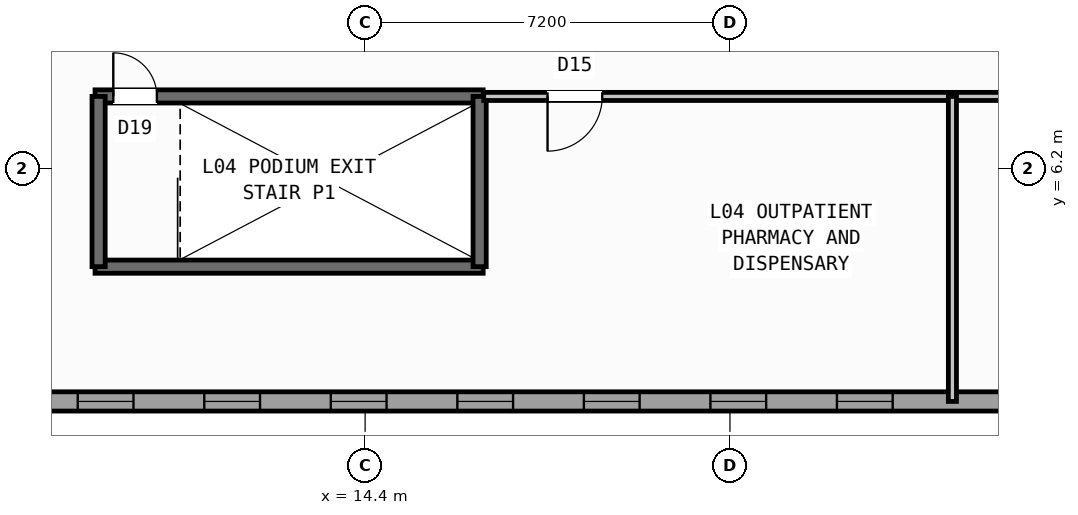
"""IFC4 building model, lengths in metres.
Left out: names, types, materials, properties, quantities, classifications, styles, units other than length and angle.
Written with IfcOpenShell. Run it as: python <this file> out.ifc"""

import sys

from ifc_helpers import new_model, si_unit, direction, frame, frame_2d, origin, place, context, subcontext, project, spatial, rectangle, extrude, source, transform, mapped, element, fill, save


model = new_model("IFC4")
c1 = context("Model", 3, precision=1e-05, world=origin(), true_north=direction((0.0, 1.0)))
c2 = subcontext(c1, "Body", "Model", "MODEL_VIEW")
j1 = project(units=[si_unit("LENGTHUNIT", "METRE"), si_unit("PLANEANGLEUNIT", "RADIAN")], contexts=[c1])
p1 = place(None, origin())
s1 = spatial("IfcSite", under=j1, at=p1, CompositionType="ELEMENT")
p2 = place(p1, origin())
s2 = spatial("IfcBuilding", under=s1, at=p2, CompositionType="ELEMENT")
p3 = place(p2, frame((0.0, 0.0, 18.6)))
s3 = spatial("IfcBuildingStorey", under=s2, at=p3, CompositionType="ELEMENT", Elevation=18.6)
p4 = place(p3, frame((67.117, 1.6, 0.0), z_axis=(0.0, 0.0, 1.0), x_axis=(-1.0, 0.0, 0.0)))
e1 = element("IfcWall", 1, at=p4, inside=s3, PredefinedType="STANDARD", context=c2, shape_type="SweptSolid", body=[
    extrude(rectangle(XDim=62.234, YDim=0.38, at=frame_2d((31.117, 0.0))), origin(), (0.0, 0.0, 1.0), 4.95),
])
p5 = place(p4, frame((1.735, 0.0, 0.85)))
e2 = element("IfcOpeningElement", 2, at=p5, cuts=e1, PredefinedType="OPENING", context=c2, shape_type="SweptSolid", body=[
    extrude(rectangle(XDim=2.2, YDim=1.75, at=frame_2d((1.1, 0.875))), frame((0.0, 0.2, 0.0), z_axis=(0.0, -1.0, 0.0), x_axis=(1.0, 0.0, 0.0)), (0.0, 0.0, 1.0), 0.4),
])
p6 = place(p4, frame((6.104, 0.0, 0.85)))
e3 = element("IfcOpeningElement", 3, at=p6, cuts=e1, PredefinedType="OPENING", context=c2, shape_type="SweptSolid", body=[
    extrude(rectangle(XDim=2.2, YDim=1.75, at=frame_2d((1.1, 0.875))), frame((0.0, 0.2, 0.0), z_axis=(0.0, -1.0, 0.0), x_axis=(1.0, 0.0, 0.0)), (0.0, 0.0, 1.0), 0.4),
])
p7 = place(p4, frame((10.473, 0.0, 0.85)))
e4 = element("IfcOpeningElement", 4, at=p7, cuts=e1, PredefinedType="OPENING", context=c2, shape_type="SweptSolid", body=[
    extrude(rectangle(XDim=2.2, YDim=1.75, at=frame_2d((1.1, 0.875))), frame((0.0, 0.2, 0.0), z_axis=(0.0, -1.0, 0.0), x_axis=(1.0, 0.0, 0.0)), (0.0, 0.0, 1.0), 0.4),
])
p8 = place(p4, frame((15.277, 0.0, 1.0)))
e5 = element("IfcOpeningElement", 5, at=p8, cuts=e1, PredefinedType="OPENING", context=c2, shape_type="SweptSolid", body=[
    extrude(rectangle(XDim=1.1, YDim=1.35, at=frame_2d((0.55, 0.675))), frame((0.0, 0.2, 0.0), z_axis=(0.0, -1.0, 0.0), x_axis=(1.0, 0.0, 0.0)), (0.0, 0.0, 1.0), 0.4),
])
p9 = place(p4, frame((18.422, 0.0, 0.95)))
e6 = element("IfcOpeningElement", 6, at=p9, cuts=e1, PredefinedType="OPENING", context=c2, shape_type="SweptSolid", body=[
    extrude(rectangle(XDim=1.4, YDim=1.5, at=frame_2d((0.7, 0.75))), frame((0.0, 0.2, 0.0), z_axis=(0.0, -1.0, 0.0), x_axis=(1.0, 0.0, 0.0)), (0.0, 0.0, 1.0), 0.4),
])
p10 = place(p4, frame((21.967, 0.0, 1.0)))
e7 = element("IfcOpeningElement", 7, at=p10, cuts=e1, PredefinedType="OPENING", context=c2, shape_type="SweptSolid", body=[
    extrude(rectangle(XDim=1.1, YDim=1.35, at=frame_2d((0.55, 0.675))), frame((0.0, 0.2, 0.0), z_axis=(0.0, -1.0, 0.0), x_axis=(1.0, 0.0, 0.0)), (0.0, 0.0, 1.0), 0.4),
])
p11 = place(p4, frame((24.387, 0.0, 1.0)))
e8 = element("IfcOpeningElement", 8, at=p11, cuts=e1, PredefinedType="OPENING", context=c2, shape_type="SweptSolid", body=[
    extrude(rectangle(XDim=1.1, YDim=1.35, at=frame_2d((0.55, 0.675))), frame((0.0, 0.2, 0.0), z_axis=(0.0, -1.0, 0.0), x_axis=(1.0, 0.0, 0.0)), (0.0, 0.0, 1.0), 0.4),
])
p12 = place(p4, frame((27.792, 0.0, 0.95)))
e9 = element("IfcOpeningElement", 9, at=p12, cuts=e1, PredefinedType="OPENING", context=c2, shape_type="SweptSolid", body=[
    extrude(rectangle(XDim=1.4, YDim=1.5, at=frame_2d((0.7, 0.75))), frame((0.0, 0.2, 0.0), z_axis=(0.0, -1.0, 0.0), x_axis=(1.0, 0.0, 0.0)), (0.0, 0.0, 1.0), 0.4),
])
p13 = place(p4, frame((30.562, 0.0, 0.95)))
e10 = element("IfcOpeningElement", 10, at=p13, cuts=e1, PredefinedType="OPENING", context=c2, shape_type="SweptSolid", body=[
    extrude(rectangle(XDim=1.4, YDim=1.5, at=frame_2d((0.7, 0.75))), frame((0.0, 0.2, 0.0), z_axis=(0.0, -1.0, 0.0), x_axis=(1.0, 0.0, 0.0)), (0.0, 0.0, 1.0), 0.4),
])
p14 = place(p4, frame((34.267, 0.0, 0.85)))
e11 = element("IfcOpeningElement", 11, at=p14, cuts=e1, PredefinedType="OPENING", context=c2, shape_type="SweptSolid", body=[
    extrude(rectangle(XDim=2.2, YDim=1.75, at=frame_2d((1.1, 0.875))), frame((0.0, 0.2, 0.0), z_axis=(0.0, -1.0, 0.0), x_axis=(1.0, 0.0, 0.0)), (0.0, 0.0, 1.0), 0.4),
])
p15 = place(p4, frame((37.787, 0.0, 0.85)))
e12 = element("IfcOpeningElement", 12, at=p15, cuts=e1, PredefinedType="OPENING", context=c2, shape_type="SweptSolid", body=[
    extrude(rectangle(XDim=2.2, YDim=1.75, at=frame_2d((1.1, 0.875))), frame((0.0, 0.2, 0.0), z_axis=(0.0, -1.0, 0.0), x_axis=(1.0, 0.0, 0.0)), (0.0, 0.0, 1.0), 0.4),
])
p16 = place(p4, frame((42.306, 0.0, 1.0)))
e13 = element("IfcOpeningElement", 13, at=p16, cuts=e1, PredefinedType="OPENING", context=c2, shape_type="SweptSolid", body=[
    extrude(rectangle(XDim=1.1, YDim=1.35, at=frame_2d((0.55, 0.675))), frame((0.0, 0.2, 0.0), z_axis=(0.0, -1.0, 0.0), x_axis=(1.0, 0.0, 0.0)), (0.0, 0.0, 1.0), 0.4),
])
p17 = place(p4, frame((44.803, 0.0, 1.0)))
e14 = element("IfcOpeningElement", 14, at=p17, cuts=e1, PredefinedType="OPENING", context=c2, shape_type="SweptSolid", body=[
    extrude(rectangle(XDim=1.1, YDim=1.35, at=frame_2d((0.55, 0.675))), frame((0.0, 0.2, 0.0), z_axis=(0.0, -1.0, 0.0), x_axis=(1.0, 0.0, 0.0)), (0.0, 0.0, 1.0), 0.4),
])
p18 = place(p4, frame((47.3, 0.0, 1.0)))
e15 = element("IfcOpeningElement", 15, at=p18, cuts=e1, PredefinedType="OPENING", context=c2, shape_type="SweptSolid", body=[
    extrude(rectangle(XDim=1.1, YDim=1.35, at=frame_2d((0.55, 0.675))), frame((0.0, 0.2, 0.0), z_axis=(0.0, -1.0, 0.0), x_axis=(1.0, 0.0, 0.0)), (0.0, 0.0, 1.0), 0.4),
])
p19 = place(p4, frame((49.797, 0.0, 1.0)))
e16 = element("IfcOpeningElement", 16, at=p19, cuts=e1, PredefinedType="OPENING", context=c2, shape_type="SweptSolid", body=[
    extrude(rectangle(XDim=1.1, YDim=1.35, at=frame_2d((0.55, 0.675))), frame((0.0, 0.2, 0.0), z_axis=(0.0, -1.0, 0.0), x_axis=(1.0, 0.0, 0.0)), (0.0, 0.0, 1.0), 0.4),
])
p20 = place(p4, frame((52.294, 0.0, 1.0)))
e17 = element("IfcOpeningElement", 17, at=p20, cuts=e1, PredefinedType="OPENING", context=c2, shape_type="SweptSolid", body=[
    extrude(rectangle(XDim=1.1, YDim=1.35, at=frame_2d((0.55, 0.675))), frame((0.0, 0.2, 0.0), z_axis=(0.0, -1.0, 0.0), x_axis=(1.0, 0.0, 0.0)), (0.0, 0.0, 1.0), 0.4),
])
p21 = place(p4, frame((54.792, 0.0, 1.0)))
e18 = element("IfcOpeningElement", 18, at=p21, cuts=e1, PredefinedType="OPENING", context=c2, shape_type="SweptSolid", body=[
    extrude(rectangle(XDim=1.1, YDim=1.35, at=frame_2d((0.55, 0.675))), frame((0.0, 0.2, 0.0), z_axis=(0.0, -1.0, 0.0), x_axis=(1.0, 0.0, 0.0)), (0.0, 0.0, 1.0), 0.4),
])
p22 = place(p4, frame((57.289, 0.0, 1.0)))
e19 = element("IfcOpeningElement", 19, at=p22, cuts=e1, PredefinedType="OPENING", context=c2, shape_type="SweptSolid", body=[
    extrude(rectangle(XDim=1.1, YDim=1.35, at=frame_2d((0.55, 0.675))), frame((0.0, 0.2, 0.0), z_axis=(0.0, -1.0, 0.0), x_axis=(1.0, 0.0, 0.0)), (0.0, 0.0, 1.0), 0.4),
])
p23 = place(p4, frame((59.786, 0.0, 1.0)))
e20 = element("IfcOpeningElement", 20, at=p23, cuts=e1, PredefinedType="OPENING", context=c2, shape_type="SweptSolid", body=[
    extrude(rectangle(XDim=1.1, YDim=1.35, at=frame_2d((0.55, 0.675))), frame((0.0, 0.2, 0.0), z_axis=(0.0, -1.0, 0.0), x_axis=(1.0, 0.0, 0.0)), (0.0, 0.0, 1.0), 0.4),
])
p24 = place(p3, frame((9.07, 7.62, 0.0), z_axis=(0.0, 0.0, 1.0), x_axis=(1.0, 0.0, 0.0)))
e21 = element("IfcWall", 21, at=p24, inside=s3, PredefinedType="SHEAR", context=c2, shape_type="SweptSolid", body=[
    extrude(rectangle(XDim=7.66, YDim=0.26, at=frame_2d((3.83, 0.0))), origin(), (0.0, 0.0, 1.0), 5.2),
])
p25 = place(p24, frame((0.36, 0.0, 0.0)))
e22 = element("IfcOpeningElement", 22, at=p25, cuts=e21, PredefinedType="OPENING", context=c2, shape_type="SweptSolid", body=[
    extrude(rectangle(XDim=0.86, YDim=2.05, at=frame_2d((0.43, 1.025))), frame((0.0, 0.14, 0.0), z_axis=(0.0, -1.0, 0.0), x_axis=(1.0, 0.0, 0.0)), (0.0, 0.0, 1.0), 0.28),
])
p26 = place(p3, frame((9.07, 4.26, 0.0), z_axis=(0.0, 0.0, 1.0), x_axis=(1.0, 0.0, 0.0)))
e23 = element("IfcWall", 23, at=p26, inside=s3, PredefinedType="SHEAR", context=c2, shape_type="SweptSolid", body=[
    extrude(rectangle(XDim=7.66, YDim=0.26, at=frame_2d((3.83, 0.0))), origin(), (0.0, 0.0, 1.0), 5.2),
])
for number, where, z_axis, x_axis in (
    (24, (9.14, 4.26, 0.0), (0.0, 0.0, 1.0), (0.0, 1.0, 0.0)),
    (25, (16.66, 4.26, 0.0), (0.0, 0.0, 1.0), (0.0, 1.0, 0.0)),
):
    element("IfcWall", number, at=place(p3, frame(where, z_axis=z_axis, x_axis=x_axis)), inside=s3, PredefinedType="SHEAR", context=c2, shape_type="SweptSolid", body=[
        extrude(rectangle(XDim=3.36, YDim=0.26, at=frame_2d((1.68, 0.0))), origin(), (0.0, 0.0, 1.0), 5.2),
    ])
p27 = place(p3, frame((16.74, 7.62, 0.0), z_axis=(0.0, 0.0, 1.0), x_axis=(1.0, 0.0, 0.0)))
e26 = element("IfcWall", 26, at=p27, inside=s3, PredefinedType="PARTITIONING", context=c2, shape_type="SweptSolid", body=[
    extrude(rectangle(XDim=39.32, YDim=0.16, at=frame_2d((19.66, 0.0))), origin(), (0.0, 0.0, 1.0), 4.94),
])
p28 = place(p27, frame((1.26, 0.0, 0.0)))
e27 = element("IfcOpeningElement", 27, at=p28, cuts=e26, PredefinedType="OPENING", context=c2, shape_type="SweptSolid", body=[
    extrude(rectangle(XDim=1.08, YDim=2.15, at=frame_2d((0.54, 1.075))), frame((0.0, 0.09, 0.0), z_axis=(0.0, -1.0, 0.0), x_axis=(1.0, 0.0, 0.0)), (0.0, 0.0, 1.0), 0.18),
])
p29 = place(p27, frame((10.24, 0.0, 0.0)))
e28 = element("IfcOpeningElement", 28, at=p29, cuts=e26, PredefinedType="OPENING", context=c2, shape_type="SweptSolid", body=[
    extrude(rectangle(XDim=1.08, YDim=2.15, at=frame_2d((0.54, 1.075))), frame((0.0, 0.09, 0.0), z_axis=(0.0, -1.0, 0.0), x_axis=(1.0, 0.0, 0.0)), (0.0, 0.0, 1.0), 0.18),
])
p30 = place(p27, frame((18.24, 0.0, 0.0)))
e29 = element("IfcOpeningElement", 29, at=p30, cuts=e26, PredefinedType="OPENING", context=c2, shape_type="SweptSolid", body=[
    extrude(rectangle(XDim=1.08, YDim=2.15, at=frame_2d((0.54, 1.075))), frame((0.0, 0.09, 0.0), z_axis=(0.0, -1.0, 0.0), x_axis=(1.0, 0.0, 0.0)), (0.0, 0.0, 1.0), 0.18),
])
p31 = place(p27, frame((24.74, 0.0, 0.0)))
e30 = element("IfcOpeningElement", 30, at=p31, cuts=e26, PredefinedType="OPENING", context=c2, shape_type="SweptSolid", body=[
    extrude(rectangle(XDim=1.08, YDim=2.15, at=frame_2d((0.54, 1.075))), frame((0.0, 0.09, 0.0), z_axis=(0.0, -1.0, 0.0), x_axis=(1.0, 0.0, 0.0)), (0.0, 0.0, 1.0), 0.18),
])
p32 = place(p27, frame((30.54, 0.0, 0.0)))
e31 = element("IfcOpeningElement", 31, at=p32, cuts=e26, PredefinedType="OPENING", context=c2, shape_type="SweptSolid", body=[
    extrude(rectangle(XDim=0.88, YDim=2.08, at=frame_2d((0.44, 1.04))), frame((0.0, 0.09, 0.0), z_axis=(0.0, -1.0, 0.0), x_axis=(1.0, 0.0, 0.0)), (0.0, 0.0, 1.0), 0.18),
])
p33 = place(p27, frame((33.94, 0.0, 0.0)))
e32 = element("IfcOpeningElement", 32, at=p33, cuts=e26, PredefinedType="OPENING", context=c2, shape_type="SweptSolid", body=[
    extrude(rectangle(XDim=0.88, YDim=2.08, at=frame_2d((0.44, 1.04))), frame((0.0, 0.09, 0.0), z_axis=(0.0, -1.0, 0.0), x_axis=(1.0, 0.0, 0.0)), (0.0, 0.0, 1.0), 0.18),
])
p34 = place(p27, frame((36.54, 0.0, 0.0)))
e33 = element("IfcOpeningElement", 33, at=p34, cuts=e26, PredefinedType="OPENING", context=c2, shape_type="SweptSolid", body=[
    extrude(rectangle(XDim=0.96, YDim=2.08, at=frame_2d((0.48, 1.04))), frame((0.0, 0.09, 0.0), z_axis=(0.0, -1.0, 0.0), x_axis=(1.0, 0.0, 0.0)), (0.0, 0.0, 1.0), 0.18),
])
p35 = place(p3, frame((25.99, 1.6, 0.0), z_axis=(0.0, 0.0, 1.0), x_axis=(0.0, 1.0, 0.0)))
e34 = element("IfcWall", 34, at=p35, inside=s3, PredefinedType="PARTITIONING", context=c2, shape_type="SweptSolid", body=[
    extrude(rectangle(XDim=6.02, YDim=0.16, at=frame_2d((3.01, 0.0))), origin(), (0.0, 0.0, 1.0), 4.94),
])
m1 = source(origin(), c2, "Body", "SweptSolid", [
    extrude(rectangle(XDim=1.1, YDim=1.35, at=frame_2d((0.55, 0.675))), frame((0.0, 0.03, 0.0), z_axis=(0.0, -1.0, 0.0), x_axis=(1.0, 0.0, 0.0)), (0.0, 0.0, 1.0), 0.06),
])
p36 = place(p16, origin())
e35 = element("IfcWindow", 35, at=p36, inside=s3, PartitioningType="SINGLE_PANEL", PredefinedType="WINDOW", context=c2, shape_type="MappedRepresentation", body=[
    mapped(m1, transform((0.0, 0.0, 0.0), scale=1.0)),
])
fill(e13, e35)
p37 = place(p17, origin())
e36 = element("IfcWindow", 36, at=p37, inside=s3, PartitioningType="SINGLE_PANEL", PredefinedType="WINDOW", context=c2, shape_type="MappedRepresentation", body=[
    mapped(m1, transform((0.0, 0.0, 0.0), scale=1.0)),
])
fill(e14, e36)
p38 = place(p18, origin())
e37 = element("IfcWindow", 37, at=p38, inside=s3, PartitioningType="SINGLE_PANEL", PredefinedType="WINDOW", context=c2, shape_type="MappedRepresentation", body=[
    mapped(m1, transform((0.0, 0.0, 0.0), scale=1.0)),
])
fill(e15, e37)
p39 = place(p19, origin())
e38 = element("IfcWindow", 38, at=p39, inside=s3, PartitioningType="SINGLE_PANEL", PredefinedType="WINDOW", context=c2, shape_type="MappedRepresentation", body=[
    mapped(m1, transform((0.0, 0.0, 0.0), scale=1.0)),
])
fill(e16, e38)
p40 = place(p20, origin())
e39 = element("IfcWindow", 39, at=p40, inside=s3, PartitioningType="SINGLE_PANEL", PredefinedType="WINDOW", context=c2, shape_type="MappedRepresentation", body=[
    mapped(m1, transform((0.0, 0.0, 0.0), scale=1.0)),
])
fill(e17, e39)
p41 = place(p21, origin())
e40 = element("IfcWindow", 40, at=p41, inside=s3, PartitioningType="SINGLE_PANEL", PredefinedType="WINDOW", context=c2, shape_type="MappedRepresentation", body=[
    mapped(m1, transform((0.0, 0.0, 0.0), scale=1.0)),
])
fill(e18, e40)
p42 = place(p22, origin())
e41 = element("IfcWindow", 41, at=p42, inside=s3, PartitioningType="SINGLE_PANEL", PredefinedType="WINDOW", context=c2, shape_type="MappedRepresentation", body=[
    mapped(m1, transform((0.0, 0.0, 0.0), scale=1.0)),
])
fill(e19, e41)
m2 = source(origin(), c2, "Body", "SweptSolid", [
    extrude(rectangle(XDim=0.86, YDim=2.05, at=frame_2d((0.43, 1.025))), frame((0.0, 0.025, 0.0), z_axis=(0.0, -1.0, 0.0), x_axis=(1.0, 0.0, 0.0)), (0.0, 0.0, 1.0), 0.05),
])
p43 = place(p25, origin())
e42 = element("IfcDoor", 42, at=p43, inside=s3, OperationType="SINGLE_SWING_LEFT", PredefinedType="DOOR", context=c2, shape_type="MappedRepresentation", body=[
    mapped(m2, transform((0.0, 0.0, 0.0), scale=1.0)),
])
fill(e22, e42)
m3 = source(origin(), c2, "Body", "SweptSolid", [
    extrude(rectangle(XDim=1.08, YDim=2.15, at=frame_2d((0.54, 1.075))), frame((0.0, 0.025, 0.0), z_axis=(0.0, -1.0, 0.0), x_axis=(1.0, 0.0, 0.0)), (0.0, 0.0, 1.0), 0.05),
])
p44 = place(p28, frame((1.08, 0.0, 0.0), z_axis=(0.0, 0.0, 1.0), x_axis=(-1.0, 0.0, 0.0)))
e43 = element("IfcDoor", 43, at=p44, inside=s3, OperationType="SINGLE_SWING_RIGHT", PredefinedType="DOOR", context=c2, shape_type="MappedRepresentation", body=[
    mapped(m3, transform((0.0, 0.0, 0.0), scale=1.0)),
])
fill(e27, e43)
save(model, sys.argv[1])
